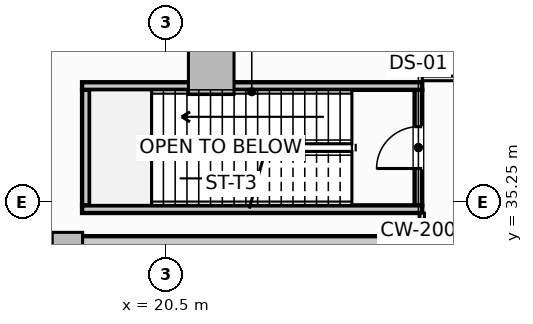
"""IFC4 building model, lengths in metres.
Left out: names, types, materials, properties, quantities, classifications, styles, units other than length and angle.
Written with IfcOpenShell. Run it as: python <this file> out.ifc"""

import sys

from ifc_helpers import new_model, si_unit, direction, frame, frame_2d, origin, origin_2d, place, context, subcontext, project, spatial, rectangle, extrude, element, fill, save


model = new_model("IFC4")
c1 = context("Model", 3, precision=1e-05, world=origin(), true_north=direction((0.0, 1.0)))
c2 = subcontext(c1, "Body", "Model", "MODEL_VIEW")
j1 = project(units=[si_unit("LENGTHUNIT", "METRE"), si_unit("PLANEANGLEUNIT", "RADIAN")], contexts=[c1])
p1 = place(None, origin())
s1 = spatial("IfcSite", under=j1, at=p1, CompositionType="ELEMENT")
p2 = place(p1, origin())
s2 = spatial("IfcBuilding", under=s1, at=p2, CompositionType="ELEMENT")
p3 = place(p2, frame((0.0, 0.0, 15.0)))
s3 = spatial("IfcBuildingStorey", under=s2, at=p3, CompositionType="ELEMENT", Elevation=15.0)
p4 = place(p3, frame((14.075, 33.925, -0.24), z_axis=(0.0, 0.0, 1.0), x_axis=(1.0, 0.0, 0.0)))
e1 = element("IfcWall", 1, at=p4, inside=s3, PredefinedType="SHEAR", context=c2, shape_type="SweptSolid", body=[
    extrude(rectangle(XDim=13.85, YDim=0.85, at=frame_2d((6.925, 0.0))), origin(), (0.0, 0.0, 1.0), 6.0),
])
p5 = place(p3, frame((21.698, 38.677, -0.24), z_axis=(0.0, 0.0, 1.0), x_axis=(1.0, 0.0, 0.0)))
e2 = element("IfcColumn", 2, at=p5, inside=s3, PredefinedType="COLUMN", context=c2, shape_type="SweptSolid", body=[
    extrude(rectangle(XDim=1.2, YDim=1.2, at=origin_2d()), origin(), (0.0, 0.0, 1.0), 6.0),
])
p6 = place(p3, frame((17.914, 34.05, -0.24), z_axis=(0.0, 0.0, 1.0), x_axis=(1.0, 0.0, 0.0)))
e3 = element("IfcColumn", 3, at=p6, inside=s3, PredefinedType="PILASTER", context=c2, shape_type="SweptSolid", body=[
    extrude(rectangle(XDim=0.8, YDim=0.8, at=origin_2d()), origin(), (0.0, 0.0, 1.0), 6.0),
])
p7 = place(p3, frame((27.15, 35.16, -0.24), z_axis=(0.0, 0.0, 1.0), x_axis=(0.0, 1.0, 0.0)))
e4 = element("IfcWall", 4, at=p7, inside=s3, PredefinedType="SHEAR", context=c2, shape_type="SweptSolid", body=[
    extrude(rectangle(XDim=3.04, YDim=0.2, at=frame_2d((1.52, 0.0))), origin(), (0.0, 0.0, 1.0), 6.0),
])
p8 = place(p7, frame((0.97, 0.0, 0.24)))
e5 = element("IfcOpeningElement", 5, at=p8, cuts=e4, PredefinedType="OPENING", context=c2, shape_type="SweptSolid", body=[
    extrude(rectangle(XDim=1.1, YDim=2.15, at=frame_2d((0.55, 1.075))), frame((0.0, 0.11, 0.0), z_axis=(0.0, -1.0, 0.0), x_axis=(1.0, 0.0, 0.0)), (0.0, 0.0, 1.0), 0.22),
])
p9 = place(p3, frame((18.4, 35.16, -0.24), z_axis=(0.0, 0.0, 1.0), x_axis=(0.0, 1.0, 0.0)))
e6 = element("IfcWall", 6, at=p9, inside=s3, PredefinedType="SHEAR", context=c2, shape_type="SweptSolid", body=[
    extrude(rectangle(XDim=3.04, YDim=0.2, at=frame_2d((1.52, 0.0))), origin(), (0.0, 0.0, 1.0), 6.0),
])
for number, where, z_axis, x_axis in (
    (7, (18.3, 38.3, -0.24), (0.0, 0.0, 1.0), (1.0, 0.0, 0.0)),
    (8, (18.3, 35.06, -0.24), (0.0, 0.0, 1.0), (1.0, 0.0, 0.0)),
):
    element("IfcWall", number, at=place(p3, frame(where, z_axis=z_axis, x_axis=x_axis)), inside=s3, PredefinedType="SHEAR", context=c2, shape_type="SweptSolid", body=[
        extrude(rectangle(XDim=8.95, YDim=0.2, at=frame_2d((4.475, 0.0))), origin(), (0.0, 0.0, 1.0), 6.0),
    ])
p10 = place(p3, frame((27.25, 34.352, 0.0), z_axis=(0.0, 0.0, 1.0), x_axis=(0.0, 1.0, 0.0)))
e9 = element("IfcWall", 9, at=p10, inside=s3, PredefinedType="PARTITIONING", context=c2, shape_type="SweptSolid", body=[
    extrude(rectangle(XDim=0.606, YDim=0.12, at=frame_2d((0.303, 0.0))), origin(), (0.0, 0.0, 1.0), 5.76),
])
p11 = place(p3, frame((27.25, 38.5, 0.0), z_axis=(0.0, 0.0, 1.0), x_axis=(1.0, 0.0, 0.0)))
e10 = element("IfcWall", 10, at=p11, inside=s3, PredefinedType="PARTITIONING", context=c2, shape_type="SweptSolid", body=[
    extrude(rectangle(XDim=2.53, YDim=0.12, at=frame_2d((1.265, 0.0))), origin(), (0.0, 0.0, 1.0), 5.76),
])
p12 = place(p8, origin())
e11 = element("IfcDoor", 11, at=p12, inside=s3, OperationType="SINGLE_SWING_LEFT", PredefinedType="DOOR", context=c2, shape_type="SweptSolid", body=[
    extrude(rectangle(XDim=1.1, YDim=2.15, at=frame_2d((0.55, 1.075))), frame((0.0, 0.025, 0.0), z_axis=(0.0, -1.0, 0.0), x_axis=(1.0, 0.0, 0.0)), (0.0, 0.0, 1.0), 0.05),
])
fill(e5, e11)
save(model, sys.argv[1])
